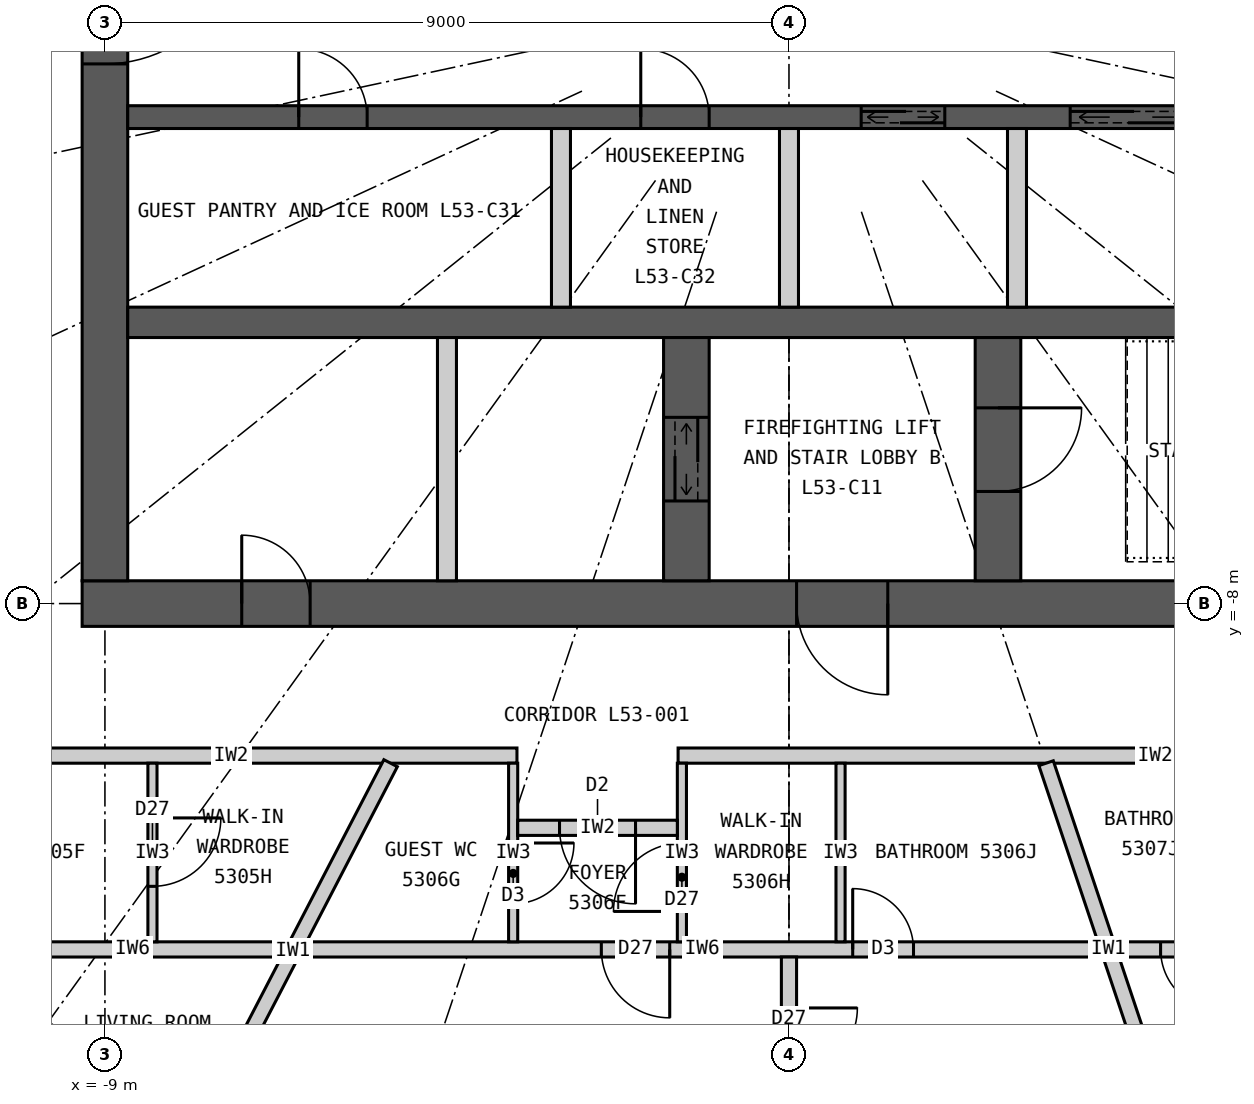
"""IFC4 building model, lengths in metres.
Left out: names, types, materials, properties, quantities, classifications, styles, units other than length and angle.
Written with IfcOpenShell. Run it as: python <this file> out.ifc"""

import sys

from ifc_helpers import new_model, si_unit, direction, frame, frame_2d, origin, origin_2d, place, context, subcontext, project, spatial, rectangle, circle, extrude, element, fill, save


model = new_model("IFC4")
c1 = context("Model", 3, precision=1e-05, world=origin(), true_north=direction((0.0, 1.0)))
c2 = subcontext(c1, "Body", "Model", "MODEL_VIEW")
j1 = project(units=[si_unit("LENGTHUNIT", "METRE"), si_unit("PLANEANGLEUNIT", "RADIAN")], contexts=[c1])
p1 = place(None, origin())
s1 = spatial("IfcSite", under=j1, at=p1, CompositionType="ELEMENT")
p2 = place(p1, origin())
s2 = spatial("IfcBuilding", under=s1, at=p2, CompositionType="ELEMENT")
p3 = place(p2, frame((0.0, 0.0, 199.5)))
s3 = spatial("IfcBuildingStorey", under=s2, at=p3, CompositionType="ELEMENT", Elevation=199.5)
p4 = place(p3, frame((-10.019, -13.883, 0.0), z_axis=(0.0, 0.0, 1.0), x_axis=(1.0, 0.0, 0.0)))
e1 = element("IfcColumn", 1, at=p4, inside=s3, PredefinedType="COLUMN", context=c2, shape_type="SweptSolid", body=[
    extrude(circle(Radius=0.45, at=origin_2d()), origin(), (0.0, 0.0, 1.0), 3.3),
])
p5 = place(p3, frame((9.3, -8.0, 0.0), z_axis=(0.0, 0.0, 1.0), x_axis=(-1.0, 0.0, 0.0)))
e2 = element("IfcWall", 2, at=p5, inside=s3, PredefinedType="SHEAR", context=c2, shape_type="SweptSolid", body=[
    extrude(rectangle(XDim=18.6, YDim=0.6, at=frame_2d((9.3, 0.0))), origin(), (0.0, 0.0, 1.0), 3.3),
])
p6 = place(p5, frame((8.0, 0.0, 0.0)))
e3 = element("IfcOpeningElement", 3, at=p6, cuts=e2, PredefinedType="OPENING", context=c2, shape_type="SweptSolid", body=[
    extrude(rectangle(XDim=1.2, YDim=2.2, at=frame_2d((0.6, 1.1))), frame((0.0, 0.31, 0.0), z_axis=(0.0, -1.0, 0.0), x_axis=(1.0, 0.0, 0.0)), (0.0, 0.0, 1.0), 0.62),
])
p7 = place(p5, frame((15.6, 0.0, 0.0)))
e4 = element("IfcOpeningElement", 4, at=p7, cuts=e2, PredefinedType="OPENING", context=c2, shape_type="SweptSolid", body=[
    extrude(rectangle(XDim=0.9, YDim=2.2, at=frame_2d((0.45, 1.1))), frame((0.0, 0.31, 0.0), z_axis=(0.0, -1.0, 0.0), x_axis=(1.0, 0.0, 0.0)), (0.0, 0.0, 1.0), 0.62),
])
p8 = place(p3, frame((-9.0, 7.7, 0.0), z_axis=(0.0, 0.0, 1.0), x_axis=(0.0, -1.0, 0.0)))
e5 = element("IfcWall", 5, at=p8, inside=s3, PredefinedType="SHEAR", context=c2, shape_type="SweptSolid", body=[
    extrude(rectangle(XDim=15.4, YDim=0.6, at=frame_2d((7.7, 0.0))), origin(), (0.0, 0.0, 1.0), 3.3),
])
p9 = place(p8, frame((6.8, 0.0, 0.0)))
e6 = element("IfcOpeningElement", 6, at=p9, cuts=e5, PredefinedType="OPENING", context=c2, shape_type="SweptSolid", body=[
    extrude(rectangle(XDim=1.8, YDim=2.2, at=frame_2d((0.9, 1.1))), frame((0.0, 0.31, 0.0), z_axis=(0.0, -1.0, 0.0), x_axis=(1.0, 0.0, 0.0)), (0.0, 0.0, 1.0), 0.62),
])
p10 = place(p3, frame((-8.7, -4.3, 0.0), z_axis=(0.0, 0.0, 1.0), x_axis=(1.0, 0.0, 0.0)))
e7 = element("IfcWall", 7, at=p10, inside=s3, PredefinedType="SHEAR", context=c2, shape_type="SweptSolid", body=[
    extrude(rectangle(XDim=17.4, YDim=0.4, at=frame_2d((8.7, 0.0))), origin(), (0.0, 0.0, 1.0), 3.3),
])
p11 = place(p3, frame((-8.7, -1.6, 0.0), z_axis=(0.0, 0.0, 1.0), x_axis=(1.0, 0.0, 0.0)))
e8 = element("IfcWall", 8, at=p11, inside=s3, PredefinedType="SHEAR", context=c2, shape_type="SweptSolid", body=[
    extrude(rectangle(XDim=17.4, YDim=0.3, at=frame_2d((8.7, 0.0))), origin(), (0.0, 0.0, 1.0), 3.3),
])
p12 = place(p11, frame((9.65, 0.0, 0.0)))
e9 = element("IfcOpeningElement", 9, at=p12, cuts=e8, PredefinedType="OPENING", context=c2, shape_type="SweptSolid", body=[
    extrude(rectangle(XDim=1.1, YDim=2.2, at=frame_2d((0.55, 1.1))), frame((0.0, 0.16, 0.0), z_axis=(0.0, -1.0, 0.0), x_axis=(1.0, 0.0, 0.0)), (0.0, 0.0, 1.0), 0.32),
])
p13 = place(p11, frame((12.4, 0.0, 0.0)))
e10 = element("IfcOpeningElement", 10, at=p13, cuts=e8, PredefinedType="OPENING", context=c2, shape_type="SweptSolid", body=[
    extrude(rectangle(XDim=1.6, YDim=2.4, at=frame_2d((0.8, 1.2))), frame((0.0, 0.16, 0.0), z_axis=(0.0, -1.0, 0.0), x_axis=(1.0, 0.0, 0.0)), (0.0, 0.0, 1.0), 0.32),
])
p14 = place(p11, frame((2.25, 0.0, 0.0)))
e11 = element("IfcOpeningElement", 11, at=p14, cuts=e8, PredefinedType="OPENING", context=c2, shape_type="SweptSolid", body=[
    extrude(rectangle(XDim=0.9, YDim=2.2, at=frame_2d((0.45, 1.1))), frame((0.0, 0.16, 0.0), z_axis=(0.0, -1.0, 0.0), x_axis=(1.0, 0.0, 0.0)), (0.0, 0.0, 1.0), 0.32),
])
p15 = place(p11, frame((6.75, 0.0, 0.0)))
e12 = element("IfcOpeningElement", 12, at=p15, cuts=e8, PredefinedType="OPENING", context=c2, shape_type="SweptSolid", body=[
    extrude(rectangle(XDim=0.9, YDim=2.2, at=frame_2d((0.45, 1.1))), frame((0.0, 0.16, 0.0), z_axis=(0.0, -1.0, 0.0), x_axis=(1.0, 0.0, 0.0)), (0.0, 0.0, 1.0), 0.32),
])
p16 = place(p3, frame((2.75, -7.7, 0.0), z_axis=(0.0, 0.0, 1.0), x_axis=(0.0, 1.0, 0.0)))
e13 = element("IfcWall", 13, at=p16, inside=s3, PredefinedType="SHEAR", context=c2, shape_type="SweptSolid", body=[
    extrude(rectangle(XDim=3.2, YDim=0.6, at=frame_2d((1.6, 0.0))), origin(), (0.0, 0.0, 1.0), 3.3),
])
p17 = place(p16, frame((1.175, 0.0, 0.0)))
e14 = element("IfcOpeningElement", 14, at=p17, cuts=e13, PredefinedType="OPENING", context=c2, shape_type="SweptSolid", body=[
    extrude(rectangle(XDim=1.1, YDim=2.2, at=frame_2d((0.55, 1.1))), frame((0.0, 0.31, 0.0), z_axis=(0.0, -1.0, 0.0), x_axis=(1.0, 0.0, 0.0)), (0.0, 0.0, 1.0), 0.62),
])
p18 = place(p3, frame((-1.35, -7.7, 0.0), z_axis=(0.0, 0.0, 1.0), x_axis=(0.0, 1.0, 0.0)))
e15 = element("IfcWall", 15, at=p18, inside=s3, PredefinedType="SHEAR", context=c2, shape_type="SweptSolid", body=[
    extrude(rectangle(XDim=3.2, YDim=0.6, at=frame_2d((1.6, 0.0))), origin(), (0.0, 0.0, 1.0), 3.3),
])
p19 = place(p18, frame((1.05, 0.0, 0.0)))
e16 = element("IfcOpeningElement", 16, at=p19, cuts=e15, PredefinedType="OPENING", context=c2, shape_type="SweptSolid", body=[
    extrude(rectangle(XDim=1.1, YDim=2.2, at=frame_2d((0.55, 1.1))), frame((0.0, 0.31, 0.0), z_axis=(0.0, -1.0, 0.0), x_axis=(1.0, 0.0, 0.0)), (0.0, 0.0, 1.0), 0.62),
])
p20 = place(p3, frame((-4.5, -7.7, 0.0), z_axis=(0.0, 0.0, 1.0), x_axis=(0.0, 1.0, 0.0)))
e17 = element("IfcWall", 17, at=p20, inside=s3, PredefinedType="PARTITIONING", context=c2, shape_type="SweptSolid", body=[
    extrude(rectangle(XDim=3.2, YDim=0.25, at=frame_2d((1.6, 0.0))), origin(), (0.0, 0.0, 1.0), 3.3),
])
for number, where, z_axis, x_axis in (
    (18, (-3.0, -4.1, 0.0), (0.0, 0.0, 1.0), (0.0, 1.0, 0.0)),
    (19, (0.0, -4.1, 0.0), (0.0, 0.0, 1.0), (0.0, 1.0, 0.0)),
    (20, (3.0, -4.1, 0.0), (0.0, 0.0, 1.0), (0.0, 1.0, 0.0)),
):
    element("IfcWall", number, at=place(p3, frame(where, z_axis=z_axis, x_axis=x_axis)), inside=s3, PredefinedType="PARTITIONING", context=c2, shape_type="SweptSolid", body=[
        extrude(rectangle(XDim=2.35, YDim=0.25, at=frame_2d((1.175, 0.0))), origin(), (0.0, 0.0, 1.0), 3.3),
    ])
p21 = place(p3, frame((11.1, -10.0, 0.0), z_axis=(0.0, 0.0, 1.0), x_axis=(-1.0, 0.0, 0.0)))
e21 = element("IfcWall", 21, at=p21, inside=s3, PredefinedType="PARTITIONING", context=c2, shape_type="SweptSolid", body=[
    extrude(rectangle(XDim=12.559, YDim=0.2, at=frame_2d((6.28, 0.0))), origin(), (0.0, 0.0, 1.0), 3.12),
])
p22 = place(p3, frame((-3.579, -10.0, 0.0), z_axis=(0.0, 0.0, 1.0), x_axis=(-1.0, 0.0, 0.0)))
e22 = element("IfcWall", 22, at=p22, inside=s3, PredefinedType="PARTITIONING", context=c2, shape_type="SweptSolid", body=[
    extrude(rectangle(XDim=7.521, YDim=0.2, at=frame_2d((3.761, 0.0))), origin(), (0.0, 0.0, 1.0), 3.12),
])
p23 = place(p22, frame((6.206, 0.0, 0.0)))
e23 = element("IfcOpeningElement", 23, at=p23, cuts=e22, PredefinedType="OPENING", context=c2, shape_type="SweptSolid", body=[
    extrude(rectangle(XDim=1.0, YDim=2.2, at=frame_2d((0.5, 1.1))), frame((0.0, 0.11, 0.0), z_axis=(0.0, -1.0, 0.0), x_axis=(1.0, 0.0, 0.0)), (0.0, 0.0, 1.0), 0.22),
])
p24 = place(p3, frame((-5.241, -10.1, 0.0), z_axis=(0.0, 0.0, 1.0), x_axis=(-0.460603196597, -0.887606160008, 0.0)))
e24 = element("IfcWall", 24, at=p24, inside=s3, PredefinedType="PARTITIONING", context=c2, shape_type="SweptSolid", body=[
    extrude(rectangle(XDim=5.58, YDim=0.2, at=frame_2d((2.79, 0.0))), origin(), (0.0, 0.0, 1.0), 3.12),
])
p25 = place(p3, frame((3.383, -10.1, 0.0), z_axis=(0.0, 0.0, 1.0), x_axis=(0.317602151035, -0.948224063003, 0.0)))
e25 = element("IfcWall", 25, at=p25, inside=s3, PredefinedType="PARTITIONING", context=c2, shape_type="SweptSolid", body=[
    extrude(rectangle(XDim=5.168, YDim=0.2, at=frame_2d((2.584, 0.0))), origin(), (0.0, 0.0, 1.0), 2.42),
])
p26 = place(p3, frame((-10.609, -12.55, 0.0), z_axis=(0.0, 0.0, 1.0), x_axis=(1.0, 0.0, 0.0)))
e26 = element("IfcWall", 26, at=p26, inside=s3, PredefinedType="PARTITIONING", context=c2, shape_type="SweptSolid", body=[
    extrude(rectangle(XDim=3.947, YDim=0.2, at=frame_2d((1.974, 0.0))), origin(), (0.0, 0.0, 1.0), 3.12),
])
p27 = place(p3, frame((-8.375, -10.1, 0.0), z_axis=(0.0, 0.0, 1.0), x_axis=(0.0, -1.0, 0.0)))
e27 = element("IfcWall", 27, at=p27, inside=s3, PredefinedType="PARTITIONING", context=c2, shape_type="SweptSolid", body=[
    extrude(rectangle(XDim=2.35, YDim=0.12, at=frame_2d((1.175, 0.0))), origin(), (0.0, 0.0, 1.0), 3.12),
])
p28 = place(p27, frame((0.72, 0.0, 0.0)))
e28 = element("IfcOpeningElement", 28, at=p28, cuts=e27, PredefinedType="OPENING", context=c2, shape_type="SweptSolid", body=[
    extrude(rectangle(XDim=0.9, YDim=2.1, at=frame_2d((0.45, 1.05))), frame((0.0, 0.07, 0.0), z_axis=(0.0, -1.0, 0.0), x_axis=(1.0, 0.0, 0.0)), (0.0, 0.0, 1.0), 0.14),
])
p29 = place(p3, frame((-6.364, -12.55, 0.0), z_axis=(0.0, 0.0, 1.0), x_axis=(1.0, 0.0, 0.0)))
e29 = element("IfcWall", 29, at=p29, inside=s3, PredefinedType="PARTITIONING", context=c2, shape_type="SweptSolid", body=[
    extrude(rectangle(XDim=10.446, YDim=0.2, at=frame_2d((5.223, 0.0))), origin(), (0.0, 0.0, 1.0), 3.12),
])
p30 = place(p29, frame((7.202, 0.0, 0.0)))
e30 = element("IfcOpeningElement", 30, at=p30, cuts=e29, PredefinedType="OPENING", context=c2, shape_type="SweptSolid", body=[
    extrude(rectangle(XDim=0.8, YDim=2.1, at=frame_2d((0.4, 1.05))), frame((0.0, 0.11, 0.0), z_axis=(0.0, -1.0, 0.0), x_axis=(1.0, 0.0, 0.0)), (0.0, 0.0, 1.0), 0.22),
])
p31 = place(p29, frame((3.895, 0.0, 0.0)))
e31 = element("IfcOpeningElement", 31, at=p31, cuts=e29, PredefinedType="OPENING", context=c2, shape_type="SweptSolid", body=[
    extrude(rectangle(XDim=0.9, YDim=2.1, at=frame_2d((0.45, 1.05))), frame((0.0, 0.11, 0.0), z_axis=(0.0, -1.0, 0.0), x_axis=(1.0, 0.0, 0.0)), (0.0, 0.0, 1.0), 0.22),
])
p32 = place(p3, frame((0.0, -12.65, 0.0), z_axis=(0.0, 0.0, 1.0), x_axis=(0.0, -1.0, 0.0)))
e32 = element("IfcWall", 32, at=p32, inside=s3, PredefinedType="PARTITIONING", context=c2, shape_type="SweptSolid", body=[
    extrude(rectangle(XDim=2.85, YDim=0.2, at=frame_2d((1.425, 0.0))), origin(), (0.0, 0.0, 1.0), 2.42),
])
p33 = place(p32, frame((0.67, 0.0, 0.0)))
e33 = element("IfcOpeningElement", 33, at=p33, cuts=e32, PredefinedType="OPENING", context=c2, shape_type="SweptSolid", body=[
    extrude(rectangle(XDim=0.9, YDim=2.1, at=frame_2d((0.45, 1.05))), frame((0.0, 0.11, 0.0), z_axis=(0.0, -1.0, 0.0), x_axis=(1.0, 0.0, 0.0)), (0.0, 0.0, 1.0), 0.22),
])
p34 = place(p3, frame((-3.629, -10.1, 0.0), z_axis=(0.0, 0.0, 1.0), x_axis=(0.0, -1.0, 0.0)))
e34 = element("IfcWall", 34, at=p34, inside=s3, PredefinedType="PARTITIONING", context=c2, shape_type="SweptSolid", body=[
    extrude(rectangle(XDim=2.35, YDim=0.12, at=frame_2d((1.175, 0.0))), origin(), (0.0, 0.0, 1.0), 3.12),
])
p35 = place(p34, frame((1.05, 0.0, 0.0)))
e35 = element("IfcOpeningElement", 35, at=p35, cuts=e34, PredefinedType="OPENING", context=c2, shape_type="SweptSolid", body=[
    extrude(rectangle(XDim=0.8, YDim=2.1, at=frame_2d((0.4, 1.05))), frame((0.0, 0.07, 0.0), z_axis=(0.0, -1.0, 0.0), x_axis=(1.0, 0.0, 0.0)), (0.0, 0.0, 1.0), 0.14),
])
p36 = place(p3, frame((-1.409, -10.1, 0.0), z_axis=(0.0, 0.0, 1.0), x_axis=(0.0, -1.0, 0.0)))
e36 = element("IfcWall", 36, at=p36, inside=s3, PredefinedType="PARTITIONING", context=c2, shape_type="SweptSolid", body=[
    extrude(rectangle(XDim=2.35, YDim=0.12, at=frame_2d((1.175, 0.0))), origin(), (0.0, 0.0, 1.0), 3.12),
])
p37 = place(p36, frame((1.05, 0.0, 0.0)))
e37 = element("IfcOpeningElement", 37, at=p37, cuts=e36, PredefinedType="OPENING", context=c2, shape_type="SweptSolid", body=[
    extrude(rectangle(XDim=0.9, YDim=2.1, at=frame_2d((0.45, 1.05))), frame((0.0, 0.07, 0.0), z_axis=(0.0, -1.0, 0.0), x_axis=(1.0, 0.0, 0.0)), (0.0, 0.0, 1.0), 0.14),
])
p38 = place(p3, frame((0.678, -10.1, 0.0), z_axis=(0.0, 0.0, 1.0), x_axis=(0.0, -1.0, 0.0)))
e38 = element("IfcWall", 38, at=p38, inside=s3, PredefinedType="PARTITIONING", context=c2, shape_type="SweptSolid", body=[
    extrude(rectangle(XDim=2.35, YDim=0.12, at=frame_2d((1.175, 0.0))), origin(), (0.0, 0.0, 1.0), 3.12),
])
p39 = place(p3, frame((-3.569, -10.95, 0.0), z_axis=(0.0, 0.0, 1.0), x_axis=(1.0, 0.0, 0.0)))
e39 = element("IfcWall", 39, at=p39, inside=s3, PredefinedType="PARTITIONING", context=c2, shape_type="SweptSolid", body=[
    extrude(rectangle(XDim=2.1, YDim=0.2, at=frame_2d((1.05, 0.0))), origin(), (0.0, 0.0, 1.0), 3.12),
])
p40 = place(p39, frame((0.55, 0.0, 0.0)))
e40 = element("IfcOpeningElement", 40, at=p40, cuts=e39, PredefinedType="OPENING", context=c2, shape_type="SweptSolid", body=[
    extrude(rectangle(XDim=1.0, YDim=2.2, at=frame_2d((0.5, 1.1))), frame((0.0, 0.11, 0.0), z_axis=(0.0, -1.0, 0.0), x_axis=(1.0, 0.0, 0.0)), (0.0, 0.0, 1.0), 0.22),
])
p41 = place(p3, frame((4.325, -12.55, 0.0), z_axis=(0.0, 0.0, 1.0), x_axis=(1.0, 0.0, 0.0)))
e41 = element("IfcWall", 41, at=p41, inside=s3, PredefinedType="PARTITIONING", context=c2, shape_type="SweptSolid", body=[
    extrude(rectangle(XDim=6.284, YDim=0.2, at=frame_2d((3.142, 0.0))), origin(), (0.0, 0.0, 1.0), 3.12),
])
p42 = place(p41, frame((0.564, 0.0, 0.0)))
e42 = element("IfcOpeningElement", 42, at=p42, cuts=e41, PredefinedType="OPENING", context=c2, shape_type="SweptSolid", body=[
    extrude(rectangle(XDim=0.8, YDim=2.1, at=frame_2d((0.4, 1.05))), frame((0.0, 0.11, 0.0), z_axis=(0.0, -1.0, 0.0), x_axis=(1.0, 0.0, 0.0)), (0.0, 0.0, 1.0), 0.22),
])
p43 = place(p28, origin())
e43 = element("IfcDoor", 43, at=p43, inside=s3, OperationType="SINGLE_SWING_LEFT", PredefinedType="DOOR", context=c2, shape_type="SweptSolid", body=[
    extrude(rectangle(XDim=0.9, YDim=2.1, at=frame_2d((0.45, 1.05))), frame((0.0, 0.025, 0.0), z_axis=(0.0, -1.0, 0.0), x_axis=(1.0, 0.0, 0.0)), (0.0, 0.0, 1.0), 0.05),
])
fill(e28, e43)
p44 = place(p40, origin())
e44 = element("IfcDoor", 44, at=p44, inside=s3, OperationType="SINGLE_SWING_RIGHT", PredefinedType="DOOR", context=c2, shape_type="SweptSolid", body=[
    extrude(rectangle(XDim=1.0, YDim=2.2, at=frame_2d((0.5, 1.1))), frame((0.0, 0.025, 0.0), z_axis=(0.0, -1.0, 0.0), x_axis=(1.0, 0.0, 0.0)), (0.0, 0.0, 1.0), 0.05),
])
fill(e40, e44)
p45 = place(p35, origin())
e45 = element("IfcDoor", 45, at=p45, inside=s3, OperationType="SINGLE_SWING_LEFT", PredefinedType="DOOR", context=c2, shape_type="SweptSolid", body=[
    extrude(rectangle(XDim=0.8, YDim=2.1, at=frame_2d((0.4, 1.05))), frame((0.0, 0.025, 0.0), z_axis=(0.0, -1.0, 0.0), x_axis=(1.0, 0.0, 0.0)), (0.0, 0.0, 1.0), 0.05),
])
fill(e35, e45)
p46 = place(p37, origin())
e46 = element("IfcDoor", 46, at=p46, inside=s3, OperationType="SINGLE_SWING_RIGHT", PredefinedType="DOOR", context=c2, shape_type="SweptSolid", body=[
    extrude(rectangle(XDim=0.9, YDim=2.1, at=frame_2d((0.45, 1.05))), frame((0.0, 0.025, 0.0), z_axis=(0.0, -1.0, 0.0), x_axis=(1.0, 0.0, 0.0)), (0.0, 0.0, 1.0), 0.05),
])
fill(e37, e46)
p47 = place(p30, origin())
e47 = element("IfcDoor", 47, at=p47, inside=s3, OperationType="SINGLE_SWING_LEFT", PredefinedType="DOOR", context=c2, shape_type="SweptSolid", body=[
    extrude(rectangle(XDim=0.8, YDim=2.1, at=frame_2d((0.4, 1.05))), frame((0.0, 0.025, 0.0), z_axis=(0.0, -1.0, 0.0), x_axis=(1.0, 0.0, 0.0)), (0.0, 0.0, 1.0), 0.05),
])
fill(e30, e47)
p48 = place(p31, origin())
e48 = element("IfcDoor", 48, at=p48, inside=s3, OperationType="SINGLE_SWING_RIGHT", PredefinedType="DOOR", context=c2, shape_type="SweptSolid", body=[
    extrude(rectangle(XDim=0.9, YDim=2.1, at=frame_2d((0.45, 1.05))), frame((0.0, 0.025, 0.0), z_axis=(0.0, -1.0, 0.0), x_axis=(1.0, 0.0, 0.0)), (0.0, 0.0, 1.0), 0.05),
])
fill(e31, e48)
p49 = place(p33, origin())
e49 = element("IfcDoor", 49, at=p49, inside=s3, OperationType="SINGLE_SWING_LEFT", PredefinedType="DOOR", context=c2, shape_type="SweptSolid", body=[
    extrude(rectangle(XDim=0.9, YDim=2.1, at=frame_2d((0.45, 1.05))), frame((0.0, 0.025, 0.0), z_axis=(0.0, -1.0, 0.0), x_axis=(1.0, 0.0, 0.0)), (0.0, 0.0, 1.0), 0.05),
])
fill(e33, e49)
p50 = place(p42, origin())
e50 = element("IfcDoor", 50, at=p50, inside=s3, OperationType="SINGLE_SWING_RIGHT", PredefinedType="DOOR", context=c2, shape_type="SweptSolid", body=[
    extrude(rectangle(XDim=0.8, YDim=2.1, at=frame_2d((0.4, 1.05))), frame((0.0, 0.025, 0.0), z_axis=(0.0, -1.0, 0.0), x_axis=(1.0, 0.0, 0.0)), (0.0, 0.0, 1.0), 0.05),
])
fill(e42, e50)
p51 = place(p6, origin())
e51 = element("IfcDoor", 51, at=p51, inside=s3, OperationType="SINGLE_SWING_LEFT", PredefinedType="DOOR", context=c2, shape_type="SweptSolid", body=[
    extrude(rectangle(XDim=1.2, YDim=2.2, at=frame_2d((0.6, 1.1))), frame((0.0, 0.025, 0.0), z_axis=(0.0, -1.0, 0.0), x_axis=(1.0, 0.0, 0.0)), (0.0, 0.0, 1.0), 0.05),
])
fill(e3, e51)
p52 = place(p17, origin())
e52 = element("IfcDoor", 52, at=p52, inside=s3, OperationType="SINGLE_SWING_RIGHT", PredefinedType="DOOR", context=c2, shape_type="SweptSolid", body=[
    extrude(rectangle(XDim=1.1, YDim=2.2, at=frame_2d((0.55, 1.1))), frame((0.0, 0.025, 0.0), z_axis=(0.0, -1.0, 0.0), x_axis=(1.0, 0.0, 0.0)), (0.0, 0.0, 1.0), 0.05),
])
fill(e14, e52)
p53 = place(p19, origin())
e53 = element("IfcDoor", 53, at=p53, inside=s3, OperationType="DOUBLE_DOOR_SLIDING", PredefinedType="DOOR", context=c2, shape_type="SweptSolid", body=[
    extrude(rectangle(XDim=1.1, YDim=2.2, at=frame_2d((0.55, 1.1))), frame((0.0, 0.025, 0.0), z_axis=(0.0, -1.0, 0.0), x_axis=(1.0, 0.0, 0.0)), (0.0, 0.0, 1.0), 0.05),
])
fill(e16, e53)
p54 = place(p7, origin())
e54 = element("IfcDoor", 54, at=p54, inside=s3, OperationType="SINGLE_SWING_RIGHT", PredefinedType="DOOR", context=c2, shape_type="SweptSolid", body=[
    extrude(rectangle(XDim=0.9, YDim=2.2, at=frame_2d((0.45, 1.1))), frame((0.0, 0.025, 0.0), z_axis=(0.0, -1.0, 0.0), x_axis=(1.0, 0.0, 0.0)), (0.0, 0.0, 1.0), 0.05),
])
fill(e4, e54)
p55 = place(p12, origin())
e55 = element("IfcDoor", 55, at=p55, inside=s3, OperationType="DOUBLE_DOOR_SLIDING", PredefinedType="DOOR", context=c2, shape_type="SweptSolid", body=[
    extrude(rectangle(XDim=1.1, YDim=2.2, at=frame_2d((0.55, 1.1))), frame((0.0, 0.025, 0.0), z_axis=(0.0, -1.0, 0.0), x_axis=(1.0, 0.0, 0.0)), (0.0, 0.0, 1.0), 0.05),
])
fill(e9, e55)
p56 = place(p13, origin())
e56 = element("IfcDoor", 56, at=p56, inside=s3, OperationType="DOUBLE_DOOR_SLIDING", PredefinedType="DOOR", context=c2, shape_type="SweptSolid", body=[
    extrude(rectangle(XDim=1.6, YDim=2.4, at=frame_2d((0.8, 1.2))), frame((0.0, 0.025, 0.0), z_axis=(0.0, -1.0, 0.0), x_axis=(1.0, 0.0, 0.0)), (0.0, 0.0, 1.0), 0.05),
])
fill(e10, e56)
p57 = place(p14, origin())
e57 = element("IfcDoor", 57, at=p57, inside=s3, OperationType="SINGLE_SWING_LEFT", PredefinedType="DOOR", context=c2, shape_type="SweptSolid", body=[
    extrude(rectangle(XDim=0.9, YDim=2.2, at=frame_2d((0.45, 1.1))), frame((0.0, 0.025, 0.0), z_axis=(0.0, -1.0, 0.0), x_axis=(1.0, 0.0, 0.0)), (0.0, 0.0, 1.0), 0.05),
])
fill(e11, e57)
p58 = place(p15, origin())
e58 = element("IfcDoor", 58, at=p58, inside=s3, OperationType="SINGLE_SWING_LEFT", PredefinedType="DOOR", context=c2, shape_type="SweptSolid", body=[
    extrude(rectangle(XDim=0.9, YDim=2.2, at=frame_2d((0.45, 1.1))), frame((0.0, 0.025, 0.0), z_axis=(0.0, -1.0, 0.0), x_axis=(1.0, 0.0, 0.0)), (0.0, 0.0, 1.0), 0.05),
])
fill(e12, e58)
p59 = place(p9, origin())
e59 = element("IfcDoor", 59, at=p59, inside=s3, OperationType="DOUBLE_DOOR_DOUBLE_SWING", PredefinedType="DOOR", context=c2, shape_type="SweptSolid", body=[
    extrude(rectangle(XDim=1.8, YDim=2.2, at=frame_2d((0.9, 1.1))), frame((0.0, 0.025, 0.0), z_axis=(0.0, -1.0, 0.0), x_axis=(1.0, 0.0, 0.0)), (0.0, 0.0, 1.0), 0.05),
])
fill(e6, e59)
save(model, sys.argv[1])
